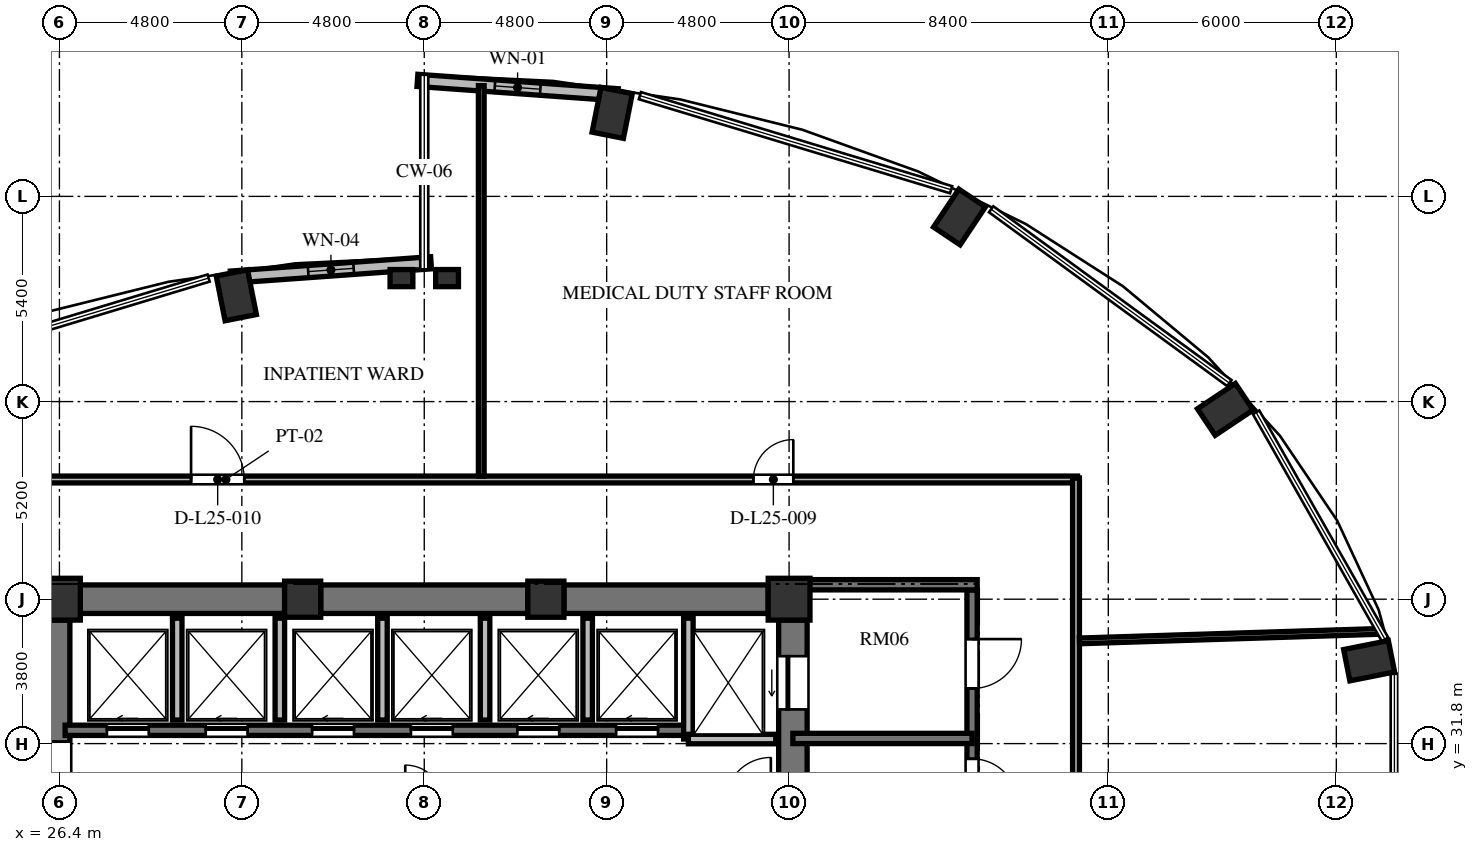
"""IFC4 building model, lengths in metres.
Left out: names, types, materials, properties, quantities, classifications, styles, units other than length and angle.
Written with IfcOpenShell. Run it as: python <this file> out.ifc"""

import sys

from ifc_helpers import new_model, si_unit, direction, frame, frame_2d, origin, origin_2d, place, context, subcontext, project, spatial, rectangle, extrude, element, fill, save


model = new_model("IFC4")
c1 = context("Model", 3, precision=1e-05, world=origin(), true_north=direction((0.0, 1.0)))
c2 = subcontext(c1, "Body", "Model", "MODEL_VIEW")
j1 = project(units=[si_unit("LENGTHUNIT", "METRE"), si_unit("PLANEANGLEUNIT", "RADIAN")], contexts=[c1])
p1 = place(None, origin())
s1 = spatial("IfcSite", under=j1, at=p1, CompositionType="ELEMENT")
p2 = place(p1, origin())
s2 = spatial("IfcBuilding", under=s1, at=p2, CompositionType="ELEMENT")
p3 = place(p2, frame((0.0, 0.0, 99.984)))
s3 = spatial("IfcBuildingStorey", under=s2, at=p3, CompositionType="ELEMENT", Elevation=99.984)
for number, where, z_axis, x_axis in (
    (1, (60.863, 33.98, 0.0), (0.0, 0.0, 1.0), (0.981, 0.195, 0.0)),
    (2, (57.078, 40.595, 0.0), (0.0, 0.0, 1.0), (0.831, 0.556, 0.0)),
    (3, (50.084, 45.657, 0.0), (0.0, 0.0, 1.0), (0.556, 0.831, 0.0)),
    (4, (40.946, 48.397, 0.0), (0.0, 0.0, 1.0), (0.195, 0.981, 0.0)),
    (5, (31.054, 43.597, 0.0), (0.0, 0.0, 1.0), (-0.195, 0.981, 0.0)),
):
    element("IfcColumn", number, at=place(p3, frame(where, z_axis=z_axis, x_axis=x_axis)), inside=s3, PredefinedType="COLUMN", context=c2, shape_type="SweptSolid", body=[
        extrude(rectangle(XDim=1.2, YDim=0.84, at=origin_2d()), origin(), (0.0, 0.0, 1.0), 3.648),
    ])
p4 = place(p3, frame((45.6, 35.6, 0.0), z_axis=(0.0, 0.0, 1.0), x_axis=(1.0, 0.0, 0.0)))
e6 = element("IfcColumn", 6, at=p4, inside=s3, PredefinedType="COLUMN", context=c2, shape_type="SweptSolid", body=[
    extrude(rectangle(XDim=1.1, YDim=1.1, at=origin_2d()), origin(), (0.0, 0.0, 1.0), 3.648),
])
for number, where, z_axis, x_axis in (
    (7, (39.2, 35.6, 0.0), (0.0, 0.0, 1.0), (1.0, 0.0, 0.0)),
    (8, (32.8, 35.6, 0.0), (0.0, 0.0, 1.0), (1.0, 0.0, 0.0)),
):
    element("IfcColumn", number, at=place(p3, frame(where, z_axis=z_axis, x_axis=x_axis)), inside=s3, PredefinedType="COLUMN", context=c2, shape_type="SweptSolid", body=[
        extrude(rectangle(XDim=0.95, YDim=0.95, at=origin_2d()), origin(), (0.0, 0.0, 1.0), 3.648),
    ])
p5 = place(p3, frame((26.4, 35.6, 0.0), z_axis=(0.0, 0.0, 1.0), x_axis=(1.0, 0.0, 0.0)))
e9 = element("IfcColumn", 9, at=p5, inside=s3, PredefinedType="COLUMN", context=c2, shape_type="SweptSolid", body=[
    extrude(rectangle(XDim=1.1, YDim=1.1, at=origin_2d()), origin(), (0.0, 0.0, 1.0), 3.648),
])
for number, where, z_axis, x_axis in (
    (10, (35.4, 44.05, 0.0), (0.0, 0.0, 1.0), (1.0, 0.0, 0.0)),
    (11, (36.6, 44.05, 0.0), (0.0, 0.0, 1.0), (1.0, 0.0, 0.0)),
):
    element("IfcColumn", number, at=place(p3, frame(where, z_axis=z_axis, x_axis=x_axis)), inside=s3, PredefinedType="PILASTER", context=c2, shape_type="SweptSolid", body=[
        extrude(rectangle(XDim=0.6, YDim=0.45, at=origin_2d()), origin(), (0.0, 0.0, 1.0), 3.648),
    ])
p6 = place(p3, frame((26.3, 20.95, 0.0), z_axis=(0.0, 0.0, 1.0), x_axis=(0.0, 1.0, 0.0)))
e12 = element("IfcWall", 12, at=p6, inside=s3, PredefinedType="SHEAR", context=c2, shape_type="SweptSolid", body=[
    extrude(rectangle(XDim=14.1, YDim=0.75, at=frame_2d((7.05, 0.0))), origin(), (0.0, 0.0, 1.0), 3.648),
])
p7 = place(p6, frame((6.5, 0.0, 0.0)))
e13 = element("IfcOpeningElement", 13, at=p7, cuts=e12, PredefinedType="OPENING", context=c2, shape_type="SweptSolid", body=[
    extrude(rectangle(XDim=1.2, YDim=2.15, at=frame_2d((0.6, 1.075))), frame((0.0, 0.385, 0.0), z_axis=(0.0, -1.0, 0.0), x_axis=(1.0, 0.0, 0.0)), (0.0, 0.0, 1.0), 0.77),
])
p8 = place(p6, frame((9.6, 0.0, 0.0)))
e14 = element("IfcOpeningElement", 14, at=p8, cuts=e12, PredefinedType="OPENING", context=c2, shape_type="SweptSolid", body=[
    extrude(rectangle(XDim=1.3, YDim=2.2, at=frame_2d((0.65, 1.1))), frame((0.0, 0.385, 0.0), z_axis=(0.0, -1.0, 0.0), x_axis=(1.0, 0.0, 0.0)), (0.0, 0.0, 1.0), 0.77),
])
p9 = place(p6, frame((3.26, 0.0, 0.0)))
e15 = element("IfcOpeningElement", 15, at=p9, cuts=e12, PredefinedType="OPENING", context=c2, shape_type="SweptSolid", body=[
    extrude(rectangle(XDim=1.3, YDim=2.2, at=frame_2d((0.65, 1.1))), frame((0.0, 0.385, 0.0), z_axis=(0.0, -1.0, 0.0), x_axis=(1.0, 0.0, 0.0)), (0.0, 0.0, 1.0), 0.77),
])
p10 = place(p3, frame((45.7, 20.95, 0.0), z_axis=(0.0, 0.0, 1.0), x_axis=(0.0, 1.0, 0.0)))
e16 = element("IfcWall", 16, at=p10, inside=s3, PredefinedType="SHEAR", context=c2, shape_type="SweptSolid", body=[
    extrude(rectangle(XDim=14.1, YDim=0.75, at=frame_2d((7.05, 0.0))), origin(), (0.0, 0.0, 1.0), 3.648),
])
p11 = place(p10, frame((11.75, 0.0, 0.0)))
e17 = element("IfcOpeningElement", 17, at=p11, cuts=e16, PredefinedType="OPENING", context=c2, shape_type="SweptSolid", body=[
    extrude(rectangle(XDim=1.4, YDim=2.3, at=frame_2d((0.7, 1.15))), frame((0.0, 0.385, 0.0), z_axis=(0.0, -1.0, 0.0), x_axis=(1.0, 0.0, 0.0)), (0.0, 0.0, 1.0), 0.77),
])
p12 = place(p10, frame((0.95, 0.0, 0.0)))
e18 = element("IfcOpeningElement", 18, at=p12, cuts=e16, PredefinedType="OPENING", context=c2, shape_type="SweptSolid", body=[
    extrude(rectangle(XDim=1.4, YDim=2.3, at=frame_2d((0.7, 1.15))), frame((0.0, 0.385, 0.0), z_axis=(0.0, -1.0, 0.0), x_axis=(1.0, 0.0, 0.0)), (0.0, 0.0, 1.0), 0.77),
])
p13 = place(p3, frame((26.95, 35.6, 0.0), z_axis=(0.0, 0.0, 1.0), x_axis=(1.0, 0.0, 0.0)))
e19 = element("IfcWall", 19, at=p13, inside=s3, PredefinedType="SHEAR", context=c2, shape_type="SweptSolid", body=[
    extrude(rectangle(XDim=5.375, YDim=0.75, at=frame_2d((2.688, 0.0))), origin(), (0.0, 0.0, 1.0), 3.648),
])
p14 = place(p3, frame((33.275, 35.6, 0.0), z_axis=(0.0, 0.0, 1.0), x_axis=(1.0, 0.0, 0.0)))
e20 = element("IfcWall", 20, at=p14, inside=s3, PredefinedType="SHEAR", context=c2, shape_type="SweptSolid", body=[
    extrude(rectangle(XDim=5.45, YDim=0.75, at=frame_2d((2.725, 0.0))), origin(), (0.0, 0.0, 1.0), 3.648),
])
p15 = place(p3, frame((39.675, 35.6, 0.0), z_axis=(0.0, 0.0, 1.0), x_axis=(1.0, 0.0, 0.0)))
e21 = element("IfcWall", 21, at=p15, inside=s3, PredefinedType="SHEAR", context=c2, shape_type="SweptSolid", body=[
    extrude(rectangle(XDim=5.375, YDim=0.75, at=frame_2d((2.688, 0.0))), origin(), (0.0, 0.0, 1.0), 3.648),
])
p16 = place(p3, frame((41.091, 48.875, 0.0), z_axis=(0.0, 0.0, 1.0), x_axis=(-0.997432364291, 0.071614793619, 0.0)))
e22 = element("IfcWall", 22, at=p16, inside=s3, PredefinedType="SOLIDWALL", context=c2, shape_type="SweptSolid", body=[
    extrude(rectangle(XDim=5.284, YDim=0.32, at=frame_2d((2.642, 0.0))), origin(), (0.0, 0.0, 1.0), 3.428),
])
p17 = place(p16, frame((2.042, 0.0, 0.85)))
e23 = element("IfcOpeningElement", 23, at=p17, cuts=e22, PredefinedType="OPENING", context=c2, shape_type="SweptSolid", body=[
    extrude(rectangle(XDim=1.2, YDim=2.2, at=frame_2d((0.6, 1.1))), frame((0.0, 0.17, 0.0), z_axis=(0.0, -1.0, 0.0), x_axis=(1.0, 0.0, 0.0)), (0.0, 0.0, 1.0), 0.34),
])
p18 = place(p3, frame((36.179, 44.453, 0.0), z_axis=(0.0, 0.0, 1.0), x_axis=(-0.997431890304, -0.071621394884, 0.0)))
e24 = element("IfcWall", 24, at=p18, inside=s3, PredefinedType="SOLIDWALL", context=c2, shape_type="SweptSolid", body=[
    extrude(rectangle(XDim=5.284, YDim=0.32, at=frame_2d((2.642, 0.0))), origin(), (0.0, 0.0, 1.0), 3.428),
])
p19 = place(p18, frame((2.042, 0.0, 0.85)))
e25 = element("IfcOpeningElement", 25, at=p19, cuts=e24, PredefinedType="OPENING", context=c2, shape_type="SweptSolid", body=[
    extrude(rectangle(XDim=1.2, YDim=1.8, at=frame_2d((0.6, 0.9))), frame((0.0, 0.17, 0.0), z_axis=(0.0, -1.0, 0.0), x_axis=(1.0, 0.0, 0.0)), (0.0, 0.0, 1.0), 0.34),
])
p20 = place(p3, frame((26.55, 32.15, 0.0), z_axis=(0.0, 0.0, 1.0), x_axis=(1.0, 0.0, 0.0)))
e26 = element("IfcWall", 26, at=p20, inside=s3, PredefinedType="SHEAR", context=c2, shape_type="SweptSolid", body=[
    extrude(rectangle(XDim=16.4, YDim=0.27, at=frame_2d((8.2, 0.0))), origin(), (0.0, 0.0, 1.0), 3.648),
])
p21 = place(p20, frame((1.1, 0.0, 0.0)))
e27 = element("IfcOpeningElement", 27, at=p21, cuts=e26, PredefinedType="OPENING", context=c2, shape_type="SweptSolid", body=[
    extrude(rectangle(XDim=1.1, YDim=2.2, at=frame_2d((0.55, 1.1))), frame((0.0, 0.145, 0.0), z_axis=(0.0, -1.0, 0.0), x_axis=(1.0, 0.0, 0.0)), (0.0, 0.0, 1.0), 0.29),
])
p22 = place(p20, frame((3.7, 0.0, 0.0)))
e28 = element("IfcOpeningElement", 28, at=p22, cuts=e26, PredefinedType="OPENING", context=c2, shape_type="SweptSolid", body=[
    extrude(rectangle(XDim=1.1, YDim=2.2, at=frame_2d((0.55, 1.1))), frame((0.0, 0.145, 0.0), z_axis=(0.0, -1.0, 0.0), x_axis=(1.0, 0.0, 0.0)), (0.0, 0.0, 1.0), 0.29),
])
p23 = place(p20, frame((6.5, 0.0, 0.0)))
e29 = element("IfcOpeningElement", 29, at=p23, cuts=e26, PredefinedType="OPENING", context=c2, shape_type="SweptSolid", body=[
    extrude(rectangle(XDim=1.1, YDim=2.2, at=frame_2d((0.55, 1.1))), frame((0.0, 0.145, 0.0), z_axis=(0.0, -1.0, 0.0), x_axis=(1.0, 0.0, 0.0)), (0.0, 0.0, 1.0), 0.29),
])
p24 = place(p20, frame((9.1, 0.0, 0.0)))
e30 = element("IfcOpeningElement", 30, at=p24, cuts=e26, PredefinedType="OPENING", context=c2, shape_type="SweptSolid", body=[
    extrude(rectangle(XDim=1.1, YDim=2.2, at=frame_2d((0.55, 1.1))), frame((0.0, 0.145, 0.0), z_axis=(0.0, -1.0, 0.0), x_axis=(1.0, 0.0, 0.0)), (0.0, 0.0, 1.0), 0.29),
])
p25 = place(p20, frame((11.9, 0.0, 0.0)))
e31 = element("IfcOpeningElement", 31, at=p25, cuts=e26, PredefinedType="OPENING", context=c2, shape_type="SweptSolid", body=[
    extrude(rectangle(XDim=1.1, YDim=2.2, at=frame_2d((0.55, 1.1))), frame((0.0, 0.145, 0.0), z_axis=(0.0, -1.0, 0.0), x_axis=(1.0, 0.0, 0.0)), (0.0, 0.0, 1.0), 0.29),
])
p26 = place(p20, frame((14.5, 0.0, 0.0)))
e32 = element("IfcOpeningElement", 32, at=p26, cuts=e26, PredefinedType="OPENING", context=c2, shape_type="SweptSolid", body=[
    extrude(rectangle(XDim=1.1, YDim=2.2, at=frame_2d((0.55, 1.1))), frame((0.0, 0.145, 0.0), z_axis=(0.0, -1.0, 0.0), x_axis=(1.0, 0.0, 0.0)), (0.0, 0.0, 1.0), 0.29),
])
p27 = place(p3, frame((42.95, 31.92, 0.0), z_axis=(0.0, 0.0, 1.0), x_axis=(0.0, 1.0, 0.0)))
e33 = element("IfcWall", 33, at=p27, inside=s3, PredefinedType="SOLIDWALL", context=c2, shape_type="SweptSolid", body=[
    extrude(rectangle(XDim=3.18, YDim=0.25, at=frame_2d((1.59, 0.0))), origin(), (0.0, 0.0, 1.0), 3.428),
])
p28 = place(p3, frame((42.95, 31.92, 0.0), z_axis=(0.0, 0.0, 1.0), x_axis=(1.0, 0.0, 0.0)))
e34 = element("IfcWall", 34, at=p28, inside=s3, PredefinedType="SOLIDWALL", context=c2, shape_type="SweptSolid", body=[
    extrude(rectangle(XDim=2.3, YDim=0.25, at=frame_2d((1.15, 0.0))), origin(), (0.0, 0.0, 1.0), 3.428),
])
for number, where, z_axis, x_axis in (
    (35, (29.5, 32.42, 0.0), (0.0, 0.0, 1.0), (0.0, 1.0, 0.0)),
    (36, (32.2, 32.42, 0.0), (0.0, 0.0, 1.0), (0.0, 1.0, 0.0)),
    (37, (34.9, 32.42, 0.0), (0.0, 0.0, 1.0), (0.0, 1.0, 0.0)),
    (38, (37.6, 32.42, 0.0), (0.0, 0.0, 1.0), (0.0, 1.0, 0.0)),
    (39, (40.3, 32.42, 0.0), (0.0, 0.0, 1.0), (0.0, 1.0, 0.0)),
):
    element("IfcWall", number, at=place(p3, frame(where, z_axis=z_axis, x_axis=x_axis)), inside=s3, PredefinedType="SOLIDWALL", context=c2, shape_type="SweptSolid", body=[
        extrude(rectangle(XDim=2.68, YDim=0.25, at=frame_2d((1.34, 0.0))), origin(), (0.0, 0.0, 1.0), 3.428),
    ])
p29 = place(p3, frame((50.415, 35.845, 0.0), z_axis=(0.0, 0.0, 1.0), x_axis=(0.0, -1.0, 0.0)))
e40 = element("IfcWall", 40, at=p29, inside=s3, PredefinedType="SHEAR", context=c2, shape_type="SweptSolid", body=[
    extrude(rectangle(XDim=15.825, YDim=0.27, at=frame_2d((7.913, 0.0))), origin(), (0.0, 0.0, 1.0), 3.648),
])
p30 = place(p29, frame((4.445, 0.0, 0.0)))
e41 = element("IfcOpeningElement", 41, at=p30, cuts=e40, PredefinedType="OPENING", context=c2, shape_type="SweptSolid", body=[
    extrude(rectangle(XDim=1.2, YDim=2.15, at=frame_2d((0.6, 1.075))), frame((0.0, 0.145, 0.0), z_axis=(0.0, -1.0, 0.0), x_axis=(1.0, 0.0, 0.0)), (0.0, 0.0, 1.0), 0.29),
])
p31 = place(p29, frame((1.295, 0.0, 0.0)))
e42 = element("IfcOpeningElement", 42, at=p31, cuts=e40, PredefinedType="OPENING", context=c2, shape_type="SweptSolid", body=[
    extrude(rectangle(XDim=1.3, YDim=2.2, at=frame_2d((0.65, 1.1))), frame((0.0, 0.145, 0.0), z_axis=(0.0, -1.0, 0.0), x_axis=(1.0, 0.0, 0.0)), (0.0, 0.0, 1.0), 0.29),
])
p32 = place(p29, frame((13.095, 0.0, 0.0)))
e43 = element("IfcOpeningElement", 43, at=p32, cuts=e40, PredefinedType="OPENING", context=c2, shape_type="SweptSolid", body=[
    extrude(rectangle(XDim=1.3, YDim=2.2, at=frame_2d((0.65, 1.1))), frame((0.0, 0.145, 0.0), z_axis=(0.0, -1.0, 0.0), x_axis=(1.0, 0.0, 0.0)), (0.0, 0.0, 1.0), 0.29),
])
p33 = place(p3, frame((46.075, 35.98, 0.0), z_axis=(0.0, 0.0, 1.0), x_axis=(1.0, 0.0, 0.0)))
e44 = element("IfcWall", 44, at=p33, inside=s3, PredefinedType="SHEAR", context=c2, shape_type="SweptSolid", body=[
    extrude(rectangle(XDim=4.475, YDim=0.27, at=frame_2d((2.238, 0.0))), origin(), (0.0, 0.0, 1.0), 3.648),
])
p34 = place(p3, frame((45.7, 31.935, 0.0), z_axis=(0.0, 0.0, 1.0), x_axis=(1.0, 0.0, 0.0)))
e45 = element("IfcWall", 45, at=p34, inside=s3, PredefinedType="SHEAR", context=c2, shape_type="SweptSolid", body=[
    extrude(rectangle(XDim=4.715, YDim=0.27, at=frame_2d((2.357, 0.0))), origin(), (0.0, 0.0, 1.0), 3.648),
])
p35 = place(p3, frame((23.31, 38.75, 0.0), z_axis=(0.0, 0.0, 1.0), x_axis=(1.0, 0.0, 0.0)))
e46 = element("IfcWall", 46, at=p35, inside=s3, PredefinedType="PARTITIONING", context=c2, shape_type="SweptSolid", body=[
    extrude(rectangle(XDim=29.88, YDim=0.18, at=frame_2d((14.94, 0.0))), origin(), (0.0, 0.0, 1.0), 3.053),
])
p36 = place(p35, frame((21.351, 0.0, 0.0)))
e47 = element("IfcOpeningElement", 47, at=p36, cuts=e46, PredefinedType="OPENING", context=c2, shape_type="SweptSolid", body=[
    extrude(rectangle(XDim=1.05, YDim=2.15, at=frame_2d((0.525, 1.075))), frame((0.0, 0.1, 0.0), z_axis=(0.0, -1.0, 0.0), x_axis=(1.0, 0.0, 0.0)), (0.0, 0.0, 1.0), 0.2),
])
p37 = place(p35, frame((6.554, 0.0, 0.0)))
e48 = element("IfcOpeningElement", 48, at=p37, cuts=e46, PredefinedType="OPENING", context=c2, shape_type="SweptSolid", body=[
    extrude(rectangle(XDim=1.4, YDim=2.2, at=frame_2d((0.7, 1.1))), frame((0.0, 0.1, 0.0), z_axis=(0.0, -1.0, 0.0), x_axis=(1.0, 0.0, 0.0)), (0.0, 0.0, 1.0), 0.2),
])
p38 = place(p3, frame((53.15, 38.79, 0.0), z_axis=(0.0, 0.0, 1.0), x_axis=(0.0, -1.0, 0.0)))
e49 = element("IfcWall", 49, at=p38, inside=s3, PredefinedType="PARTITIONING", context=c2, shape_type="SweptSolid", body=[
    extrude(rectangle(XDim=9.43, YDim=0.18, at=frame_2d((4.715, 0.0))), origin(), (0.0, 0.0, 1.0), 3.428),
])
p39 = place(p3, frame((53.24, 34.502, 0.0), z_axis=(0.0, 0.0, 1.0), x_axis=(0.999499445349, 0.031636351679, 0.0)))
e50 = element("IfcWall", 50, at=p39, inside=s3, PredefinedType="PARTITIONING", context=c2, shape_type="SweptSolid", body=[
    extrude(rectangle(XDim=7.933, YDim=0.15, at=frame_2d((3.967, 0.0))), origin(), (0.0, 0.0, 1.0), 2.813),
])
p40 = place(p3, frame((37.5, 38.84, 0.0), z_axis=(0.0, 0.0, 1.0), x_axis=(0.0, 1.0, 0.0)))
e51 = element("IfcWall", 51, at=p40, inside=s3, PredefinedType="PARTITIONING", context=c2, shape_type="SweptSolid", body=[
    extrude(rectangle(XDim=10.274, YDim=0.15, at=frame_2d((5.137, 0.0))), origin(), (0.0, 0.0, 1.0), 3.428),
])
p41 = place(p17, origin())
e52 = element("IfcWindow", 52, at=p41, inside=s3, PartitioningType="SINGLE_PANEL", PredefinedType="WINDOW", context=c2, shape_type="SweptSolid", body=[
    extrude(rectangle(XDim=1.2, YDim=2.2, at=frame_2d((0.6, 1.1))), frame((0.0, 0.03, 0.0), z_axis=(0.0, -1.0, 0.0), x_axis=(1.0, 0.0, 0.0)), (0.0, 0.0, 1.0), 0.06),
])
fill(e23, e52)
p42 = place(p19, origin())
e53 = element("IfcWindow", 53, at=p42, inside=s3, PartitioningType="SINGLE_PANEL", PredefinedType="WINDOW", context=c2, shape_type="SweptSolid", body=[
    extrude(rectangle(XDim=1.2, YDim=1.8, at=frame_2d((0.6, 0.9))), frame((0.0, 0.03, 0.0), z_axis=(0.0, -1.0, 0.0), x_axis=(1.0, 0.0, 0.0)), (0.0, 0.0, 1.0), 0.06),
])
fill(e25, e53)
p43 = place(p8, origin())
e54 = element("IfcDoor", 54, at=p43, inside=s3, OperationType="SINGLE_SWING_RIGHT", PredefinedType="DOOR", context=c2, shape_type="SweptSolid", body=[
    extrude(rectangle(XDim=1.3, YDim=2.2, at=frame_2d((0.65, 1.1))), frame((0.0, 0.025, 0.0), z_axis=(0.0, -1.0, 0.0), x_axis=(1.0, 0.0, 0.0)), (0.0, 0.0, 1.0), 0.05),
])
fill(e14, e54)
p44 = place(p21, origin())
e55 = element("IfcDoor", 55, at=p44, inside=s3, OperationType="SLIDING_TO_LEFT", PredefinedType="DOOR", context=c2, shape_type="SweptSolid", body=[
    extrude(rectangle(XDim=1.1, YDim=2.2, at=frame_2d((0.55, 1.1))), frame((0.0, 0.025, 0.0), z_axis=(0.0, -1.0, 0.0), x_axis=(1.0, 0.0, 0.0)), (0.0, 0.0, 1.0), 0.05),
])
fill(e27, e55)
p45 = place(p22, origin())
e56 = element("IfcDoor", 56, at=p45, inside=s3, OperationType="SLIDING_TO_LEFT", PredefinedType="DOOR", context=c2, shape_type="SweptSolid", body=[
    extrude(rectangle(XDim=1.1, YDim=2.2, at=frame_2d((0.55, 1.1))), frame((0.0, 0.025, 0.0), z_axis=(0.0, -1.0, 0.0), x_axis=(1.0, 0.0, 0.0)), (0.0, 0.0, 1.0), 0.05),
])
fill(e28, e56)
p46 = place(p23, origin())
e57 = element("IfcDoor", 57, at=p46, inside=s3, OperationType="SLIDING_TO_LEFT", PredefinedType="DOOR", context=c2, shape_type="SweptSolid", body=[
    extrude(rectangle(XDim=1.1, YDim=2.2, at=frame_2d((0.55, 1.1))), frame((0.0, 0.025, 0.0), z_axis=(0.0, -1.0, 0.0), x_axis=(1.0, 0.0, 0.0)), (0.0, 0.0, 1.0), 0.05),
])
fill(e29, e57)
p47 = place(p24, origin())
e58 = element("IfcDoor", 58, at=p47, inside=s3, OperationType="SLIDING_TO_LEFT", PredefinedType="DOOR", context=c2, shape_type="SweptSolid", body=[
    extrude(rectangle(XDim=1.1, YDim=2.2, at=frame_2d((0.55, 1.1))), frame((0.0, 0.025, 0.0), z_axis=(0.0, -1.0, 0.0), x_axis=(1.0, 0.0, 0.0)), (0.0, 0.0, 1.0), 0.05),
])
fill(e30, e58)
p48 = place(p25, origin())
e59 = element("IfcDoor", 59, at=p48, inside=s3, OperationType="SLIDING_TO_LEFT", PredefinedType="DOOR", context=c2, shape_type="SweptSolid", body=[
    extrude(rectangle(XDim=1.1, YDim=2.2, at=frame_2d((0.55, 1.1))), frame((0.0, 0.025, 0.0), z_axis=(0.0, -1.0, 0.0), x_axis=(1.0, 0.0, 0.0)), (0.0, 0.0, 1.0), 0.05),
])
fill(e31, e59)
p49 = place(p26, origin())
e60 = element("IfcDoor", 60, at=p49, inside=s3, OperationType="SLIDING_TO_LEFT", PredefinedType="DOOR", context=c2, shape_type="SweptSolid", body=[
    extrude(rectangle(XDim=1.1, YDim=2.2, at=frame_2d((0.55, 1.1))), frame((0.0, 0.025, 0.0), z_axis=(0.0, -1.0, 0.0), x_axis=(1.0, 0.0, 0.0)), (0.0, 0.0, 1.0), 0.05),
])
fill(e32, e60)
p50 = place(p11, origin())
e61 = element("IfcDoor", 61, at=p50, inside=s3, OperationType="SLIDING_TO_LEFT", PredefinedType="DOOR", context=c2, shape_type="SweptSolid", body=[
    extrude(rectangle(XDim=1.4, YDim=2.3, at=frame_2d((0.7, 1.15))), frame((0.0, 0.025, 0.0), z_axis=(0.0, -1.0, 0.0), x_axis=(1.0, 0.0, 0.0)), (0.0, 0.0, 1.0), 0.05),
])
fill(e17, e61)
p51 = place(p30, origin())
e62 = element("IfcDoor", 62, at=p51, inside=s3, OperationType="SINGLE_SWING_RIGHT", PredefinedType="DOOR", context=c2, shape_type="SweptSolid", body=[
    extrude(rectangle(XDim=1.2, YDim=2.15, at=frame_2d((0.6, 1.075))), frame((0.0, 0.025, 0.0), z_axis=(0.0, -1.0, 0.0), x_axis=(1.0, 0.0, 0.0)), (0.0, 0.0, 1.0), 0.05),
])
fill(e41, e62)
p52 = place(p31, origin())
e63 = element("IfcDoor", 63, at=p52, inside=s3, OperationType="SINGLE_SWING_LEFT", PredefinedType="DOOR", context=c2, shape_type="SweptSolid", body=[
    extrude(rectangle(XDim=1.3, YDim=2.2, at=frame_2d((0.65, 1.1))), frame((0.0, 0.025, 0.0), z_axis=(0.0, -1.0, 0.0), x_axis=(1.0, 0.0, 0.0)), (0.0, 0.0, 1.0), 0.05),
])
fill(e42, e63)
p53 = place(p36, origin())
e64 = element("IfcDoor", 64, at=p53, inside=s3, OperationType="SINGLE_SWING_RIGHT", PredefinedType="DOOR", context=c2, shape_type="SweptSolid", body=[
    extrude(rectangle(XDim=1.05, YDim=2.15, at=frame_2d((0.525, 1.075))), frame((0.0, 0.025, 0.0), z_axis=(0.0, -1.0, 0.0), x_axis=(1.0, 0.0, 0.0)), (0.0, 0.0, 1.0), 0.05),
])
fill(e47, e64)
p54 = place(p37, origin())
e65 = element("IfcDoor", 65, at=p54, inside=s3, OperationType="SINGLE_SWING_LEFT", PredefinedType="DOOR", context=c2, shape_type="SweptSolid", body=[
    extrude(rectangle(XDim=1.4, YDim=2.2, at=frame_2d((0.7, 1.1))), frame((0.0, 0.025, 0.0), z_axis=(0.0, -1.0, 0.0), x_axis=(1.0, 0.0, 0.0)), (0.0, 0.0, 1.0), 0.05),
])
fill(e48, e65)
save(model, sys.argv[1])
